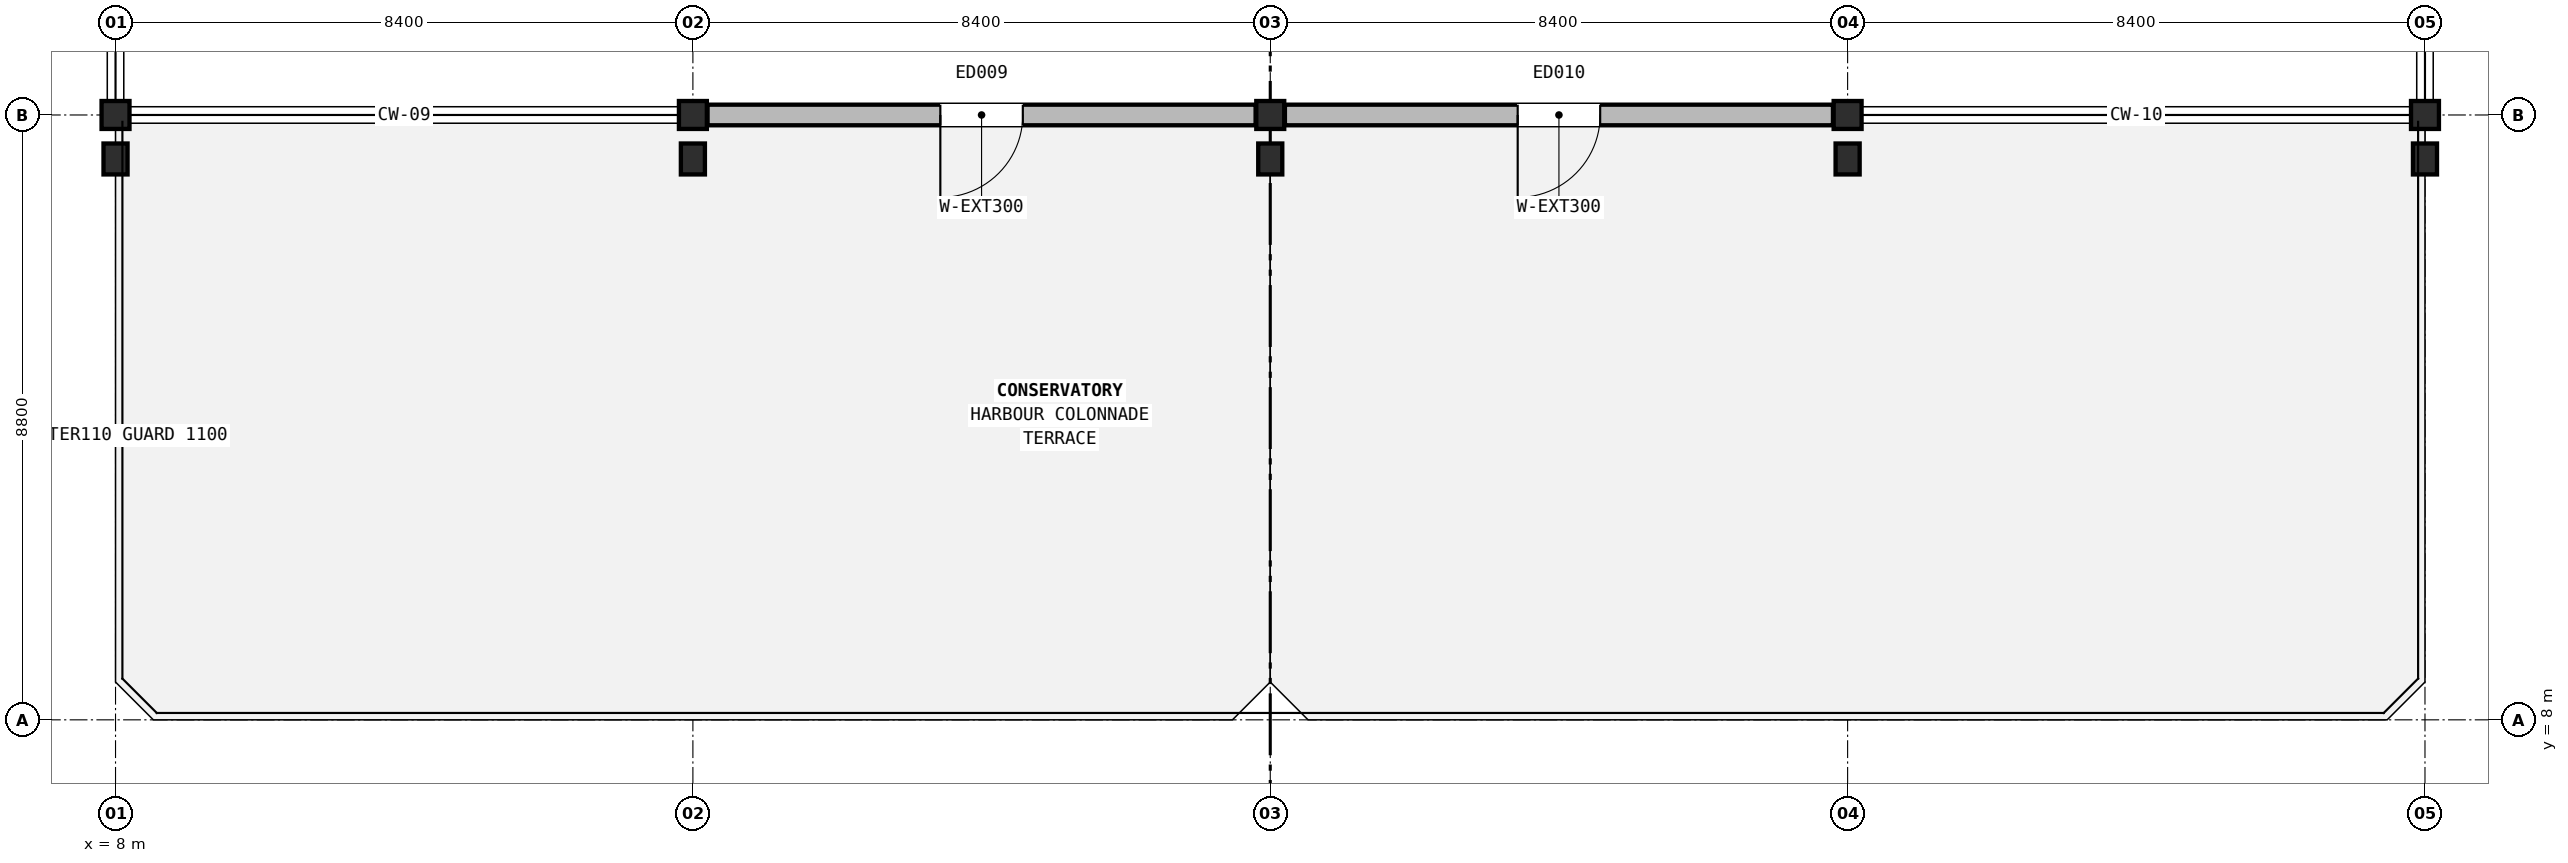
"""IFC4 building model, lengths in metres.
Left out: names, types, materials, properties, quantities, classifications, styles, units other than length and angle.
Written with IfcOpenShell. Run it as: python <this file> out.ifc"""

import sys

from ifc_helpers import new_model, si_unit, direction, frame, frame_2d, origin, origin_2d, place, context, subcontext, project, spatial, rectangle, hollow_circle, extrude, element, fill, save


model = new_model("IFC4")
c1 = context("Model", 3, precision=1e-05, world=origin(), true_north=direction((0.0, 1.0)))
c2 = subcontext(c1, "Body", "Model", "MODEL_VIEW")
j1 = project(units=[si_unit("LENGTHUNIT", "METRE"), si_unit("PLANEANGLEUNIT", "RADIAN")], contexts=[c1])
p1 = place(None, origin())
s1 = spatial("IfcSite", under=j1, at=p1, CompositionType="ELEMENT")
p2 = place(p1, origin())
s2 = spatial("IfcBuilding", under=s1, at=p2, CompositionType="ELEMENT")
p3 = place(p2, frame((0.0, 0.0, 4.8)))
s3 = spatial("IfcBuildingStorey", under=s2, at=p3, CompositionType="ELEMENT", Elevation=4.8)
p4 = place(p3, frame((8.0, 16.8, 0.0), z_axis=(0.0, 0.0, 1.0), x_axis=(1.0, 0.0, 0.0)))
e1 = element("IfcColumn", 1, at=p4, inside=s3, PredefinedType="COLUMN", context=c2, shape_type="SweptSolid", body=[
    extrude(hollow_circle(Radius=0.203, WallThickness=0.016, at=origin_2d()), origin(), (0.0, 0.0, 1.0), 4.2),
])
p5 = place(p3, frame((8.0, 16.16, 0.0), z_axis=(0.0, 0.0, 1.0), x_axis=(1.0, 0.0, 0.0)))
e2 = element("IfcColumn", 2, at=p5, inside=s3, PredefinedType="PILASTER", context=c2, shape_type="SweptSolid", body=[
    extrude(rectangle(XDim=0.35, YDim=0.45, at=origin_2d()), origin(), (0.0, 0.0, 1.0), 4.2),
])
p6 = place(p3, frame((16.4, 16.8, 0.0), z_axis=(0.0, 0.0, 1.0), x_axis=(1.0, 0.0, 0.0)))
e3 = element("IfcColumn", 3, at=p6, inside=s3, PredefinedType="COLUMN", context=c2, shape_type="SweptSolid", body=[
    extrude(hollow_circle(Radius=0.203, WallThickness=0.016, at=origin_2d()), origin(), (0.0, 0.0, 1.0), 4.2),
])
p7 = place(p3, frame((16.4, 16.16, 0.0), z_axis=(0.0, 0.0, 1.0), x_axis=(1.0, 0.0, 0.0)))
e4 = element("IfcColumn", 4, at=p7, inside=s3, PredefinedType="PILASTER", context=c2, shape_type="SweptSolid", body=[
    extrude(rectangle(XDim=0.35, YDim=0.45, at=origin_2d()), origin(), (0.0, 0.0, 1.0), 4.2),
])
p8 = place(p3, frame((24.8, 16.8, 0.0), z_axis=(0.0, 0.0, 1.0), x_axis=(1.0, 0.0, 0.0)))
e5 = element("IfcColumn", 5, at=p8, inside=s3, PredefinedType="COLUMN", context=c2, shape_type="SweptSolid", body=[
    extrude(hollow_circle(Radius=0.203, WallThickness=0.016, at=origin_2d()), origin(), (0.0, 0.0, 1.0), 4.2),
])
p9 = place(p3, frame((24.8, 16.16, 0.0), z_axis=(0.0, 0.0, 1.0), x_axis=(1.0, 0.0, 0.0)))
e6 = element("IfcColumn", 6, at=p9, inside=s3, PredefinedType="PILASTER", context=c2, shape_type="SweptSolid", body=[
    extrude(rectangle(XDim=0.35, YDim=0.45, at=origin_2d()), origin(), (0.0, 0.0, 1.0), 4.2),
])
p10 = place(p3, frame((33.2, 16.8, 0.0), z_axis=(0.0, 0.0, 1.0), x_axis=(1.0, 0.0, 0.0)))
e7 = element("IfcColumn", 7, at=p10, inside=s3, PredefinedType="COLUMN", context=c2, shape_type="SweptSolid", body=[
    extrude(hollow_circle(Radius=0.203, WallThickness=0.016, at=origin_2d()), origin(), (0.0, 0.0, 1.0), 4.2),
])
p11 = place(p3, frame((33.2, 16.16, 0.0), z_axis=(0.0, 0.0, 1.0), x_axis=(1.0, 0.0, 0.0)))
e8 = element("IfcColumn", 8, at=p11, inside=s3, PredefinedType="PILASTER", context=c2, shape_type="SweptSolid", body=[
    extrude(rectangle(XDim=0.35, YDim=0.45, at=origin_2d()), origin(), (0.0, 0.0, 1.0), 4.2),
])
p12 = place(p3, frame((41.6, 16.8, 0.0), z_axis=(0.0, 0.0, 1.0), x_axis=(1.0, 0.0, 0.0)))
e9 = element("IfcColumn", 9, at=p12, inside=s3, PredefinedType="COLUMN", context=c2, shape_type="SweptSolid", body=[
    extrude(hollow_circle(Radius=0.203, WallThickness=0.016, at=origin_2d()), origin(), (0.0, 0.0, 1.0), 4.2),
])
p13 = place(p3, frame((41.6, 16.16, 0.0), z_axis=(0.0, 0.0, 1.0), x_axis=(1.0, 0.0, 0.0)))
e10 = element("IfcColumn", 10, at=p13, inside=s3, PredefinedType="PILASTER", context=c2, shape_type="SweptSolid", body=[
    extrude(rectangle(XDim=0.35, YDim=0.45, at=origin_2d()), origin(), (0.0, 0.0, 1.0), 4.2),
])
p14 = place(p3, frame((16.613, 16.8, 0.0), z_axis=(0.0, 0.0, 1.0), x_axis=(1.0, 0.0, 0.0)))
e11 = element("IfcWall", 11, at=p14, inside=s3, PredefinedType="SOLIDWALL", context=c2, shape_type="SweptSolid", body=[
    extrude(rectangle(XDim=7.974, YDim=0.3, at=frame_2d((3.987, 0.0))), origin(), (0.0, 0.0, 1.0), 3.491),
])
p15 = place(p14, frame((3.387, 0.0, 0.0)))
e12 = element("IfcOpeningElement", 12, at=p15, cuts=e11, PredefinedType="OPENING", context=c2, shape_type="SweptSolid", body=[
    extrude(rectangle(XDim=1.2, YDim=2.25, at=frame_2d((0.6, 1.125))), frame((0.0, 0.16, 0.0), z_axis=(0.0, -1.0, 0.0), x_axis=(1.0, 0.0, 0.0)), (0.0, 0.0, 1.0), 0.32),
])
p16 = place(p3, frame((25.013, 16.8, 0.0), z_axis=(0.0, 0.0, 1.0), x_axis=(1.0, 0.0, 0.0)))
e13 = element("IfcWall", 13, at=p16, inside=s3, PredefinedType="SOLIDWALL", context=c2, shape_type="SweptSolid", body=[
    extrude(rectangle(XDim=7.974, YDim=0.3, at=frame_2d((3.987, 0.0))), origin(), (0.0, 0.0, 1.0), 3.491),
])
p17 = place(p16, frame((3.387, 0.0, 0.0)))
e14 = element("IfcOpeningElement", 14, at=p17, cuts=e13, PredefinedType="OPENING", context=c2, shape_type="SweptSolid", body=[
    extrude(rectangle(XDim=1.2, YDim=2.25, at=frame_2d((0.6, 1.125))), frame((0.0, 0.16, 0.0), z_axis=(0.0, -1.0, 0.0), x_axis=(1.0, 0.0, 0.0)), (0.0, 0.0, 1.0), 0.32),
])
p18 = place(p15, frame((1.2, 0.0, 0.0), z_axis=(0.0, 0.0, 1.0), x_axis=(-1.0, 0.0, 0.0)))
e15 = element("IfcDoor", 15, at=p18, inside=s3, OperationType="SINGLE_SWING_LEFT", PredefinedType="DOOR", context=c2, shape_type="SweptSolid", body=[
    extrude(rectangle(XDim=1.2, YDim=2.25, at=frame_2d((0.6, 1.125))), frame((0.0, 0.025, 0.0), z_axis=(0.0, -1.0, 0.0), x_axis=(1.0, 0.0, 0.0)), (0.0, 0.0, 1.0), 0.05),
])
fill(e12, e15)
p19 = place(p17, frame((1.2, 0.0, 0.0), z_axis=(0.0, 0.0, 1.0), x_axis=(-1.0, 0.0, 0.0)))
e16 = element("IfcDoor", 16, at=p19, inside=s3, OperationType="SINGLE_SWING_LEFT", PredefinedType="DOOR", context=c2, shape_type="SweptSolid", body=[
    extrude(rectangle(XDim=1.2, YDim=2.25, at=frame_2d((0.6, 1.125))), frame((0.0, 0.025, 0.0), z_axis=(0.0, -1.0, 0.0), x_axis=(1.0, 0.0, 0.0)), (0.0, 0.0, 1.0), 0.05),
])
fill(e14, e16)
save(model, sys.argv[1])
